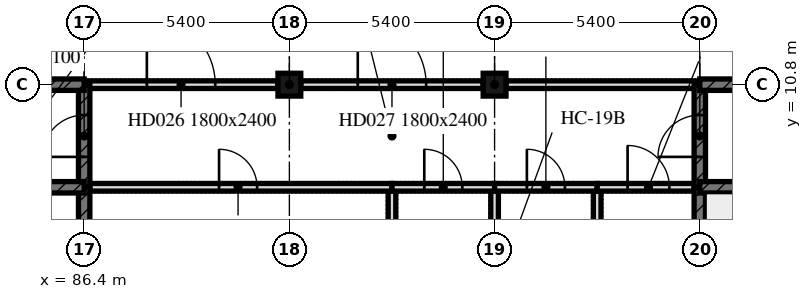
"""IFC4 building model, lengths in metres.
Left out: names, types, materials, properties, quantities, classifications, styles, units other than length and angle.
Written with IfcOpenShell. Run it as: python <this file> out.ifc"""

import sys

from ifc_helpers import new_model, si_unit, direction, frame, frame_2d, origin, origin_2d, place, context, subcontext, project, spatial, rectangle, extrude, element, fill, save


model = new_model("IFC4")
c1 = context("Model", 3, precision=1e-05, world=origin(), true_north=direction((0.0, 1.0)))
c2 = subcontext(c1, "Body", "Model", "MODEL_VIEW")
j1 = project(units=[si_unit("LENGTHUNIT", "METRE"), si_unit("PLANEANGLEUNIT", "RADIAN")], contexts=[c1])
p1 = place(None, origin())
s1 = spatial("IfcSite", under=j1, at=p1, CompositionType="ELEMENT")
p2 = place(p1, origin())
s2 = spatial("IfcBuilding", under=s1, at=p2, CompositionType="ELEMENT")
p3 = place(p2, origin())
s3 = spatial("IfcBuildingStorey", under=s2, at=p3, CompositionType="ELEMENT", Elevation=0.0)
for number, where, z_axis, x_axis in (
    (1, (91.8, 10.8, -0.4), (0.0, 0.0, 1.0), (1.0, 0.0, 0.0)),
    (2, (97.2, 10.8, -0.4), (0.0, 0.0, 1.0), (1.0, 0.0, 0.0)),
):
    element("IfcColumn", number, at=place(p3, frame(where, z_axis=z_axis, x_axis=x_axis)), inside=s3, PredefinedType="COLUMN", context=c2, shape_type="SweptSolid", body=[
        extrude(rectangle(XDim=0.6, YDim=0.6, at=origin_2d()), origin(), (0.0, 0.0, 1.0), 8.5),
    ])
p4 = place(p3, frame((94.5, 0.75, 0.0), z_axis=(0.0, 0.0, 1.0), x_axis=(0.0, 1.0, 0.0)))
e3 = element("IfcWall", 3, at=p4, inside=s3, PredefinedType="PARTITIONING", context=c2, shape_type="SweptSolid", body=[
    extrude(rectangle(XDim=7.35, YDim=0.2, at=frame_2d((3.675, 0.0))), origin(), (0.0, 0.0, 1.0), 8.1),
])
p5 = place(p3, frame((86.4, 8.1, 0.0), z_axis=(0.0, 0.0, 1.0), x_axis=(1.0, 0.0, 0.0)))
e4 = element("IfcWall", 4, at=p5, inside=s3, PredefinedType="PARTITIONING", context=c2, shape_type="SweptSolid", body=[
    extrude(rectangle(XDim=8.1, YDim=0.2, at=frame_2d((4.05, 0.0))), origin(), (0.0, 0.0, 1.0), 8.1),
])
p6 = place(p5, frame((3.55, 0.0, 0.0)))
e5 = element("IfcOpeningElement", 5, at=p6, cuts=e4, PredefinedType="OPENING", context=c2, shape_type="SweptSolid", body=[
    extrude(rectangle(XDim=1.0, YDim=2.1, at=frame_2d((0.5, 1.05))), frame((0.0, 0.1, 0.0), z_axis=(0.0, -1.0, 0.0), x_axis=(1.0, 0.0, 0.0)), (0.0, 0.0, 1.0), 0.2),
])
p7 = place(p3, frame((86.4, 0.45, 0.0), z_axis=(0.0, 0.0, 1.0), x_axis=(0.0, 1.0, 0.0)))
e6 = element("IfcWall", 6, at=p7, inside=s3, PredefinedType="SHEAR", context=c2, shape_type="SweptSolid", body=[
    extrude(rectangle(XDim=7.65, YDim=0.3, at=frame_2d((3.825, 0.0))), origin(), (0.0, 0.0, 1.0), 8.1),
])
p8 = place(p3, frame((97.2, 5.7, 0.0), z_axis=(0.0, 0.0, 1.0), x_axis=(0.0, 1.0, 0.0)))
e7 = element("IfcWall", 7, at=p8, inside=s3, PredefinedType="PARTITIONING", context=c2, shape_type="SweptSolid", body=[
    extrude(rectangle(XDim=2.4, YDim=0.2, at=frame_2d((1.2, 0.0))), origin(), (0.0, 0.0, 1.0), 8.1),
])
p9 = place(p3, frame((94.5, 8.1, 0.0), z_axis=(0.0, 0.0, 1.0), x_axis=(1.0, 0.0, 0.0)))
e8 = element("IfcWall", 8, at=p9, inside=s3, PredefinedType="PARTITIONING", context=c2, shape_type="SweptSolid", body=[
    extrude(rectangle(XDim=2.7, YDim=0.2, at=frame_2d((1.35, 0.0))), origin(), (0.0, 0.0, 1.0), 8.1),
])
p10 = place(p9, frame((0.85, 0.0, 0.0)))
e9 = element("IfcOpeningElement", 9, at=p10, cuts=e8, PredefinedType="OPENING", context=c2, shape_type="SweptSolid", body=[
    extrude(rectangle(XDim=1.0, YDim=2.1, at=frame_2d((0.5, 1.05))), frame((0.0, 0.1, 0.0), z_axis=(0.0, -1.0, 0.0), x_axis=(1.0, 0.0, 0.0)), (0.0, 0.0, 1.0), 0.2),
])
p11 = place(p3, frame((99.9, 0.75, 0.0), z_axis=(0.0, 0.0, 1.0), x_axis=(0.0, 1.0, 0.0)))
e10 = element("IfcWall", 10, at=p11, inside=s3, PredefinedType="PARTITIONING", context=c2, shape_type="SweptSolid", body=[
    extrude(rectangle(XDim=7.35, YDim=0.2, at=frame_2d((3.675, 0.0))), origin(), (0.0, 0.0, 1.0), 8.1),
])
p12 = place(p3, frame((97.2, 8.1, 0.0), z_axis=(0.0, 0.0, 1.0), x_axis=(1.0, 0.0, 0.0)))
e11 = element("IfcWall", 11, at=p12, inside=s3, PredefinedType="PARTITIONING", context=c2, shape_type="SweptSolid", body=[
    extrude(rectangle(XDim=2.7, YDim=0.2, at=frame_2d((1.35, 0.0))), origin(), (0.0, 0.0, 1.0), 8.1),
])
p13 = place(p12, frame((0.85, 0.0, 0.0)))
e12 = element("IfcOpeningElement", 12, at=p13, cuts=e11, PredefinedType="OPENING", context=c2, shape_type="SweptSolid", body=[
    extrude(rectangle(XDim=1.0, YDim=2.1, at=frame_2d((0.5, 1.05))), frame((0.0, 0.1, 0.0), z_axis=(0.0, -1.0, 0.0), x_axis=(1.0, 0.0, 0.0)), (0.0, 0.0, 1.0), 0.2),
])
p14 = place(p3, frame((99.9, 8.1, 0.0), z_axis=(0.0, 0.0, 1.0), x_axis=(1.0, 0.0, 0.0)))
e13 = element("IfcWall", 13, at=p14, inside=s3, PredefinedType="PARTITIONING", context=c2, shape_type="SweptSolid", body=[
    extrude(rectangle(XDim=2.7, YDim=0.2, at=frame_2d((1.35, 0.0))), origin(), (0.0, 0.0, 1.0), 8.1),
])
p15 = place(p14, frame((0.8, 0.0, 0.0)))
e14 = element("IfcOpeningElement", 14, at=p15, cuts=e13, PredefinedType="OPENING", context=c2, shape_type="SweptSolid", body=[
    extrude(rectangle(XDim=1.1, YDim=2.1, at=frame_2d((0.55, 1.05))), frame((0.0, 0.1, 0.0), z_axis=(0.0, -1.0, 0.0), x_axis=(1.0, 0.0, 0.0)), (0.0, 0.0, 1.0), 0.2),
])
p16 = place(p3, frame((102.6, 0.45, 0.0), z_axis=(0.0, 0.0, 1.0), x_axis=(0.0, 1.0, 0.0)))
e15 = element("IfcWall", 15, at=p16, inside=s3, PredefinedType="SHEAR", context=c2, shape_type="SweptSolid", body=[
    extrude(rectangle(XDim=7.65, YDim=0.3, at=frame_2d((3.825, 0.0))), origin(), (0.0, 0.0, 1.0), 8.1),
])
p17 = place(p3, frame((86.4, 10.8, 0.0), z_axis=(0.0, 0.0, 1.0), x_axis=(1.0, 0.0, 0.0)))
e16 = element("IfcWall", 16, at=p17, inside=s3, PredefinedType="PARTITIONING", context=c2, shape_type="SweptSolid", body=[
    extrude(rectangle(XDim=5.1, YDim=0.2, at=frame_2d((2.55, 0.0))), origin(), (0.0, 0.0, 1.0), 8.1),
])
p18 = place(p17, frame((1.65, 0.0, 0.0)))
e17 = element("IfcOpeningElement", 17, at=p18, cuts=e16, PredefinedType="OPENING", context=c2, shape_type="SweptSolid", body=[
    extrude(rectangle(XDim=1.8, YDim=2.4, at=frame_2d((0.9, 1.2))), frame((0.0, 0.1, 0.0), z_axis=(0.0, -1.0, 0.0), x_axis=(1.0, 0.0, 0.0)), (0.0, 0.0, 1.0), 0.2),
])
p19 = place(p3, frame((92.1, 10.8, 0.0), z_axis=(0.0, 0.0, 1.0), x_axis=(1.0, 0.0, 0.0)))
e18 = element("IfcWall", 18, at=p19, inside=s3, PredefinedType="PARTITIONING", context=c2, shape_type="SweptSolid", body=[
    extrude(rectangle(XDim=4.8, YDim=0.2, at=frame_2d((2.4, 0.0))), origin(), (0.0, 0.0, 1.0), 8.1),
])
p20 = place(p19, frame((1.5, 0.0, 0.0)))
e19 = element("IfcOpeningElement", 19, at=p20, cuts=e18, PredefinedType="OPENING", context=c2, shape_type="SweptSolid", body=[
    extrude(rectangle(XDim=1.8, YDim=2.4, at=frame_2d((0.9, 1.2))), frame((0.0, 0.1, 0.0), z_axis=(0.0, -1.0, 0.0), x_axis=(1.0, 0.0, 0.0)), (0.0, 0.0, 1.0), 0.2),
])
p21 = place(p3, frame((97.5, 10.8, 0.0), z_axis=(0.0, 0.0, 1.0), x_axis=(1.0, 0.0, 0.0)))
e20 = element("IfcWall", 20, at=p21, inside=s3, PredefinedType="PARTITIONING", context=c2, shape_type="SweptSolid", body=[
    extrude(rectangle(XDim=5.1, YDim=0.2, at=frame_2d((2.55, 0.0))), origin(), (0.0, 0.0, 1.0), 8.1),
])
p22 = place(p3, frame((86.4, 8.1, 0.0), z_axis=(0.0, 0.0, 1.0), x_axis=(0.0, 1.0, 0.0)))
e21 = element("IfcWall", 21, at=p22, inside=s3, PredefinedType="SHEAR", context=c2, shape_type="SweptSolid", body=[
    extrude(rectangle(XDim=2.7, YDim=0.3, at=frame_2d((1.35, 0.0))), origin(), (0.0, 0.0, 1.0), 8.1),
])
p23 = place(p22, frame((0.8, 0.0, 0.0)))
e22 = element("IfcOpeningElement", 22, at=p23, cuts=e21, PredefinedType="OPENING", context=c2, shape_type="SweptSolid", body=[
    extrude(rectangle(XDim=1.1, YDim=2.1, at=frame_2d((0.55, 1.05))), frame((0.0, 0.15, 0.0), z_axis=(0.0, -1.0, 0.0), x_axis=(1.0, 0.0, 0.0)), (0.0, 0.0, 1.0), 0.3),
])
p24 = place(p3, frame((102.6, 8.1, 0.0), z_axis=(0.0, 0.0, 1.0), x_axis=(0.0, 1.0, 0.0)))
e23 = element("IfcWall", 23, at=p24, inside=s3, PredefinedType="SHEAR", context=c2, shape_type="SweptSolid", body=[
    extrude(rectangle(XDim=2.7, YDim=0.3, at=frame_2d((1.35, 0.0))), origin(), (0.0, 0.0, 1.0), 8.1),
])
p25 = place(p24, frame((0.8, 0.0, 0.0)))
e24 = element("IfcOpeningElement", 24, at=p25, cuts=e23, PredefinedType="OPENING", context=c2, shape_type="SweptSolid", body=[
    extrude(rectangle(XDim=1.1, YDim=2.1, at=frame_2d((0.55, 1.05))), frame((0.0, 0.15, 0.0), z_axis=(0.0, -1.0, 0.0), x_axis=(1.0, 0.0, 0.0)), (0.0, 0.0, 1.0), 0.3),
])
p26 = place(p3, frame((81.0, 10.8, 0.0), z_axis=(0.0, 0.0, 1.0), x_axis=(1.0, 0.0, 0.0)))
e25 = element("IfcWall", 25, at=p26, inside=s3, PredefinedType="SHEAR", context=c2, shape_type="SweptSolid", body=[
    extrude(rectangle(XDim=5.4, YDim=0.3, at=frame_2d((2.7, 0.0))), origin(), (0.0, 0.0, 1.0), 8.1),
])
p27 = place(p3, frame((102.6, 10.8, 0.0), z_axis=(0.0, 0.0, 1.0), x_axis=(1.0, 0.0, 0.0)))
e26 = element("IfcWall", 26, at=p27, inside=s3, PredefinedType="SHEAR", context=c2, shape_type="SweptSolid", body=[
    extrude(rectangle(XDim=10.8, YDim=0.3, at=frame_2d((5.4, 0.0))), origin(), (0.0, 0.0, 1.0), 8.1),
])
p28 = place(p3, frame((85.1, 8.1, 0.0), z_axis=(0.0, 0.0, 1.0), x_axis=(1.0, 0.0, 0.0)))
e27 = element("IfcWall", 27, at=p28, inside=s3, PredefinedType="SHEAR", context=c2, shape_type="SweptSolid", body=[
    extrude(rectangle(XDim=1.3, YDim=0.3, at=frame_2d((0.65, 0.0))), origin(), (0.0, 0.0, 1.0), 8.1),
])
p29 = place(p3, frame((102.6, 8.1, 0.0), z_axis=(0.0, 0.0, 1.0), x_axis=(1.0, 0.0, 0.0)))
e28 = element("IfcWall", 28, at=p29, inside=s3, PredefinedType="SHEAR", context=c2, shape_type="SweptSolid", body=[
    extrude(rectangle(XDim=3.45, YDim=0.3, at=frame_2d((1.725, 0.0))), origin(), (0.0, 0.0, 1.0), 8.1),
])
p30 = place(p29, frame((1.175, 0.0, 0.0)))
e29 = element("IfcOpeningElement", 29, at=p30, cuts=e28, PredefinedType="OPENING", context=c2, shape_type="SweptSolid", body=[
    extrude(rectangle(XDim=1.1, YDim=2.1, at=frame_2d((0.55, 1.05))), frame((0.0, 0.15, 0.0), z_axis=(0.0, -1.0, 0.0), x_axis=(1.0, 0.0, 0.0)), (0.0, 0.0, 1.0), 0.3),
])
p31 = place(p6, origin())
e30 = element("IfcDoor", 30, at=p31, inside=s3, OperationType="SINGLE_SWING_LEFT", PredefinedType="DOOR", context=c2, shape_type="SweptSolid", body=[
    extrude(rectangle(XDim=1.0, YDim=2.1, at=frame_2d((0.5, 1.05))), frame((0.0, 0.025, 0.0), z_axis=(0.0, -1.0, 0.0), x_axis=(1.0, 0.0, 0.0)), (0.0, 0.0, 1.0), 0.05),
])
fill(e5, e30)
p32 = place(p10, origin())
e31 = element("IfcDoor", 31, at=p32, inside=s3, OperationType="SINGLE_SWING_LEFT", PredefinedType="DOOR", context=c2, shape_type="SweptSolid", body=[
    extrude(rectangle(XDim=1.0, YDim=2.1, at=frame_2d((0.5, 1.05))), frame((0.0, 0.025, 0.0), z_axis=(0.0, -1.0, 0.0), x_axis=(1.0, 0.0, 0.0)), (0.0, 0.0, 1.0), 0.05),
])
fill(e9, e31)
p33 = place(p13, origin())
e32 = element("IfcDoor", 32, at=p33, inside=s3, OperationType="SINGLE_SWING_LEFT", PredefinedType="DOOR", context=c2, shape_type="SweptSolid", body=[
    extrude(rectangle(XDim=1.0, YDim=2.1, at=frame_2d((0.5, 1.05))), frame((0.0, 0.025, 0.0), z_axis=(0.0, -1.0, 0.0), x_axis=(1.0, 0.0, 0.0)), (0.0, 0.0, 1.0), 0.05),
])
fill(e12, e32)
p34 = place(p15, origin())
e33 = element("IfcDoor", 33, at=p34, inside=s3, OperationType="SINGLE_SWING_LEFT", PredefinedType="DOOR", context=c2, shape_type="SweptSolid", body=[
    extrude(rectangle(XDim=1.1, YDim=2.1, at=frame_2d((0.55, 1.05))), frame((0.0, 0.025, 0.0), z_axis=(0.0, -1.0, 0.0), x_axis=(1.0, 0.0, 0.0)), (0.0, 0.0, 1.0), 0.05),
])
fill(e14, e33)
p35 = place(p23, origin())
e34 = element("IfcDoor", 34, at=p35, inside=s3, OperationType="SINGLE_SWING_LEFT", PredefinedType="DOOR", context=c2, shape_type="SweptSolid", body=[
    extrude(rectangle(XDim=1.1, YDim=2.1, at=frame_2d((0.55, 1.05))), frame((0.0, 0.025, 0.0), z_axis=(0.0, -1.0, 0.0), x_axis=(1.0, 0.0, 0.0)), (0.0, 0.0, 1.0), 0.05),
])
fill(e22, e34)
p36 = place(p25, origin())
e35 = element("IfcDoor", 35, at=p36, inside=s3, OperationType="SINGLE_SWING_LEFT", PredefinedType="DOOR", context=c2, shape_type="SweptSolid", body=[
    extrude(rectangle(XDim=1.1, YDim=2.1, at=frame_2d((0.55, 1.05))), frame((0.0, 0.025, 0.0), z_axis=(0.0, -1.0, 0.0), x_axis=(1.0, 0.0, 0.0)), (0.0, 0.0, 1.0), 0.05),
])
fill(e24, e35)
p37 = place(p18, origin())
e36 = element("IfcDoor", 36, at=p37, inside=s3, OperationType="DOUBLE_DOOR_SINGLE_SWING", PredefinedType="DOOR", context=c2, shape_type="SweptSolid", body=[
    extrude(rectangle(XDim=1.8, YDim=2.4, at=frame_2d((0.9, 1.2))), frame((0.0, 0.025, 0.0), z_axis=(0.0, -1.0, 0.0), x_axis=(1.0, 0.0, 0.0)), (0.0, 0.0, 1.0), 0.05),
])
fill(e17, e36)
p38 = place(p20, origin())
e37 = element("IfcDoor", 37, at=p38, inside=s3, OperationType="DOUBLE_DOOR_SINGLE_SWING", PredefinedType="DOOR", context=c2, shape_type="SweptSolid", body=[
    extrude(rectangle(XDim=1.8, YDim=2.4, at=frame_2d((0.9, 1.2))), frame((0.0, 0.025, 0.0), z_axis=(0.0, -1.0, 0.0), x_axis=(1.0, 0.0, 0.0)), (0.0, 0.0, 1.0), 0.05),
])
fill(e19, e37)
save(model, sys.argv[1])
